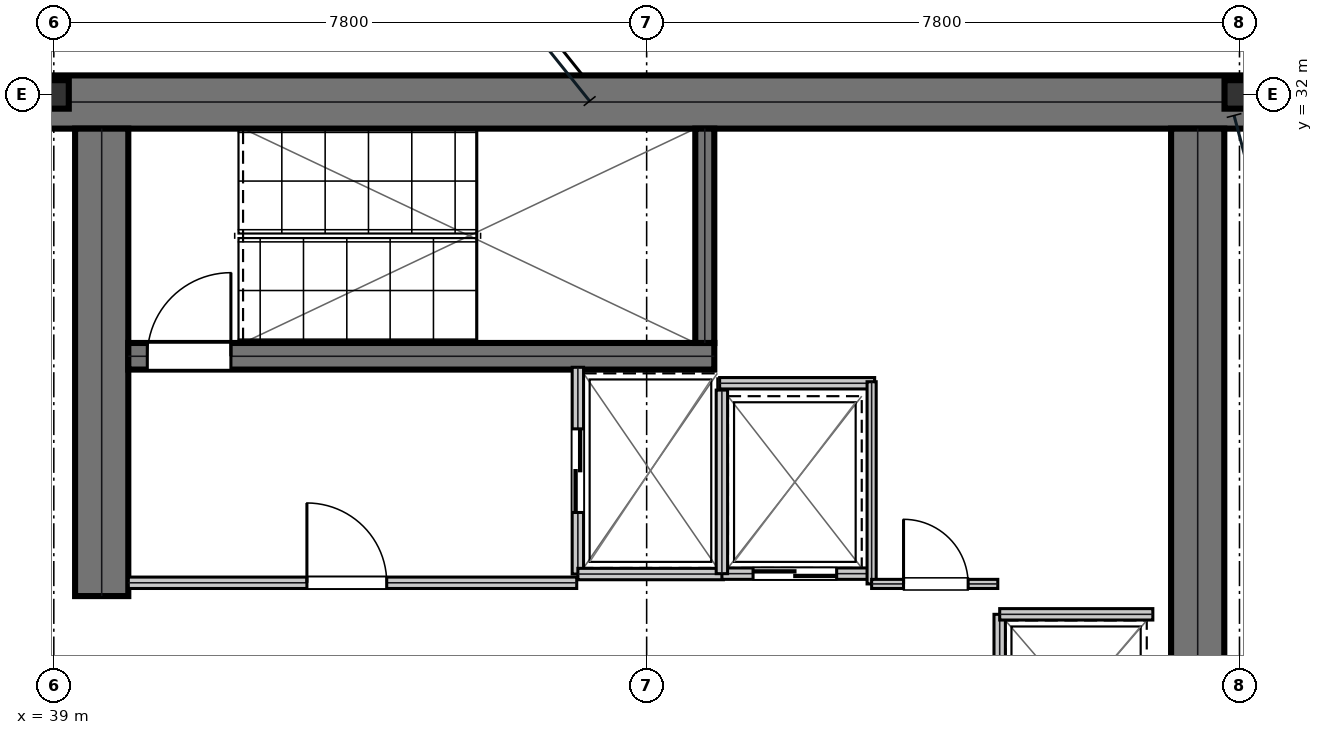
"""IFC4 building model, lengths in metres.
Left out: names, types, materials, properties, quantities, classifications, styles, units other than length and angle.
Written with IfcOpenShell. Run it as: python <this file> out.ifc"""

import sys

from ifc_helpers import new_model, si_unit, direction, frame, frame_2d, origin, origin_2d, place, context, subcontext, project, spatial, rectangle, i_section, extrude, element, fill, save


model = new_model("IFC4")
c1 = context("Model", 3, precision=1e-05, world=origin(), true_north=direction((0.0, 1.0)))
c2 = subcontext(c1, "Body", "Model", "MODEL_VIEW")
j1 = project(units=[si_unit("LENGTHUNIT", "METRE"), si_unit("PLANEANGLEUNIT", "RADIAN")], contexts=[c1])
p1 = place(None, origin())
s1 = spatial("IfcSite", under=j1, at=p1, CompositionType="ELEMENT")
p2 = place(p1, origin())
s2 = spatial("IfcBuilding", under=s1, at=p2, CompositionType="ELEMENT")
p3 = place(p2, frame((0.0, 0.0, 252.6)))
s3 = spatial("IfcBuildingStorey", under=s2, at=p3, CompositionType="ELEMENT", Elevation=252.6)
p4 = place(p3, frame((38.8, 31.9, 0.0), z_axis=(0.0, 0.0, 1.0), x_axis=(1.0, 0.0, 0.0)))
e1 = element("IfcWall", 1, at=p4, inside=s3, PredefinedType="SHEAR", context=c2, shape_type="SweptSolid", body=[
    extrude(rectangle(XDim=16.0, YDim=0.7, at=frame_2d((8.0, 0.0))), origin(), (0.0, 0.0, 1.0), 3.73),
])
p5 = place(p3, frame((39.63, 25.4, 0.0), z_axis=(0.0, 0.0, 1.0), x_axis=(0.0, 1.0, 0.0)))
e2 = element("IfcWall", 2, at=p5, inside=s3, PredefinedType="SHEAR", context=c2, shape_type="SweptSolid", body=[
    extrude(rectangle(XDim=6.15, YDim=0.7, at=frame_2d((3.075, 0.0))), origin(), (0.0, 0.0, 1.0), 3.73),
])
p6 = place(p3, frame((54.05, 16.45, 0.0), z_axis=(0.0, 0.0, 1.0), x_axis=(0.0, 1.0, 0.0)))
e3 = element("IfcWall", 3, at=p6, inside=s3, PredefinedType="SHEAR", context=c2, shape_type="SweptSolid", body=[
    extrude(rectangle(XDim=15.1, YDim=0.7, at=frame_2d((7.55, 0.0))), origin(), (0.0, 0.0, 1.0), 3.73),
])
p7 = place(p3, frame((39.98, 28.555, 0.0), z_axis=(0.0, 0.0, 1.0), x_axis=(1.0, 0.0, 0.0)))
e4 = element("IfcWall", 4, at=p7, inside=s3, PredefinedType="SHEAR", context=c2, shape_type="SweptSolid", body=[
    extrude(rectangle(XDim=7.71, YDim=0.35, at=frame_2d((3.855, 0.0))), origin(), (0.0, 0.0, 1.0), 3.73),
])
p8 = place(p7, frame((0.25, 0.0, 0.0)))
e5 = element("IfcOpeningElement", 5, at=p8, cuts=e4, PredefinedType="OPENING", context=c2, shape_type="SweptSolid", body=[
    extrude(rectangle(XDim=1.1, YDim=2.15, at=frame_2d((0.55, 1.075))), frame((0.0, 0.185, 0.0), z_axis=(0.0, -1.0, 0.0), x_axis=(1.0, 0.0, 0.0)), (0.0, 0.0, 1.0), 0.37),
])
p9 = place(p3, frame((47.565, 28.73, 0.0), z_axis=(0.0, 0.0, 1.0), x_axis=(0.0, 1.0, 0.0)))
e6 = element("IfcWall", 6, at=p9, inside=s3, PredefinedType="SHEAR", context=c2, shape_type="SweptSolid", body=[
    extrude(rectangle(XDim=2.82, YDim=0.25, at=frame_2d((1.41, 0.0))), origin(), (0.0, 0.0, 1.0), 3.73),
])
for number, where, z_axis, x_axis in (
    (7, (39.0, 32.0, 0.0), (0.0, 0.0, 1.0), (1.0, 0.0, 0.0)),
    (8, (54.6, 32.0, 0.0), (0.0, 0.0, 1.0), (1.0, 0.0, 0.0)),
):
    element("IfcColumn", number, at=place(p3, frame(where, z_axis=z_axis, x_axis=x_axis)), inside=s3, PredefinedType="COLUMN", context=c2, shape_type="SweptSolid", body=[
        extrude(i_section(OverallWidth=0.394, OverallDepth=0.375, WebThickness=0.017, FlangeThickness=0.028, at=origin_2d()), origin(), (0.0, 0.0, 1.0), 4.044),
    ])
p10 = place(p3, frame((39.98, 25.575, 0.0), z_axis=(0.0, 0.0, 1.0), x_axis=(1.0, 0.0, 0.0)))
e9 = element("IfcWall", 9, at=p10, inside=s3, PredefinedType="PARTITIONING", context=c2, shape_type="SweptSolid", body=[
    extrude(rectangle(XDim=5.9, YDim=0.15, at=frame_2d((2.95, 0.0))), origin(), (0.0, 0.0, 1.0), 3.73),
])
p11 = place(p10, frame((2.35, 0.0, 0.0)))
e10 = element("IfcOpeningElement", 10, at=p11, cuts=e9, PredefinedType="OPENING", context=c2, shape_type="SweptSolid", body=[
    extrude(rectangle(XDim=1.05, YDim=2.15, at=frame_2d((0.525, 1.075))), frame((0.0, 0.085, 0.0), z_axis=(0.0, -1.0, 0.0), x_axis=(1.0, 0.0, 0.0)), (0.0, 0.0, 1.0), 0.17),
])
p12 = place(p3, frame((45.895, 25.69, 0.0), z_axis=(0.0, 0.0, 1.0), x_axis=(0.0, 1.0, 0.0)))
e11 = element("IfcWall", 11, at=p12, inside=s3, PredefinedType="PARTITIONING", context=c2, shape_type="SweptSolid", body=[
    extrude(rectangle(XDim=2.72, YDim=0.15, at=frame_2d((1.36, 0.0))), origin(), (0.0, 0.0, 1.0), 3.73),
])
p13 = place(p12, frame((0.81, 0.0, 0.0)))
e12 = element("IfcOpeningElement", 12, at=p13, cuts=e11, PredefinedType="OPENING", context=c2, shape_type="SweptSolid", body=[
    extrude(rectangle(XDim=1.1, YDim=2.15, at=frame_2d((0.55, 1.075))), frame((0.0, 0.085, 0.0), z_axis=(0.0, -1.0, 0.0), x_axis=(1.0, 0.0, 0.0)), (0.0, 0.0, 1.0), 0.17),
])
p14 = place(p3, frame((45.895, 25.69, 0.0), z_axis=(0.0, 0.0, 1.0), x_axis=(1.0, 0.0, 0.0)))
e13 = element("IfcWall", 13, at=p14, inside=s3, PredefinedType="PARTITIONING", context=c2, shape_type="SweptSolid", body=[
    extrude(rectangle(XDim=1.915, YDim=0.15, at=frame_2d((0.958, 0.0))), origin(), (0.0, 0.0, 1.0), 3.73),
])
p15 = place(p3, frame((47.79, 25.695, 0.0), z_axis=(0.0, 0.0, 1.0), x_axis=(1.0, 0.0, 0.0)))
e14 = element("IfcWall", 14, at=p15, inside=s3, PredefinedType="PARTITIONING", context=c2, shape_type="SweptSolid", body=[
    extrude(rectangle(XDim=1.92, YDim=0.15, at=frame_2d((0.96, 0.0))), origin(), (0.0, 0.0, 1.0), 3.73),
])
p16 = place(p15, frame((0.41, 0.0, 0.0)))
e15 = element("IfcOpeningElement", 15, at=p16, cuts=e14, PredefinedType="OPENING", context=c2, shape_type="SweptSolid", body=[
    extrude(rectangle(XDim=1.1, YDim=2.15, at=frame_2d((0.55, 1.075))), frame((0.0, 0.085, 0.0), z_axis=(0.0, -1.0, 0.0), x_axis=(1.0, 0.0, 0.0)), (0.0, 0.0, 1.0), 0.17),
])
p17 = place(p3, frame((47.79, 25.695, 0.0), z_axis=(0.0, 0.0, 1.0), x_axis=(0.0, 1.0, 0.0)))
e16 = element("IfcWall", 16, at=p17, inside=s3, PredefinedType="PARTITIONING", context=c2, shape_type="SweptSolid", body=[
    extrude(rectangle(XDim=2.415, YDim=0.15, at=frame_2d((1.208, 0.0))), origin(), (0.0, 0.0, 1.0), 3.73),
])
p18 = place(p3, frame((51.445, 22.84, 0.0), z_axis=(0.0, 0.0, 1.0), x_axis=(0.0, 1.0, 0.0)))
e17 = element("IfcWall", 17, at=p18, inside=s3, PredefinedType="PARTITIONING", context=c2, shape_type="SweptSolid", body=[
    extrude(rectangle(XDim=2.32, YDim=0.15, at=frame_2d((1.16, 0.0))), origin(), (0.0, 0.0, 1.0), 3.73),
])
p19 = place(p18, frame((0.61, 0.0, 0.0)))
e18 = element("IfcOpeningElement", 18, at=p19, cuts=e17, PredefinedType="OPENING", context=c2, shape_type="SweptSolid", body=[
    extrude(rectangle(XDim=1.1, YDim=2.15, at=frame_2d((0.55, 1.075))), frame((0.0, 0.085, 0.0), z_axis=(0.0, -1.0, 0.0), x_axis=(1.0, 0.0, 0.0)), (0.0, 0.0, 1.0), 0.17),
])
p20 = place(p3, frame((51.445, 25.16, 0.0), z_axis=(0.0, 0.0, 1.0), x_axis=(1.0, 0.0, 0.0)))
e19 = element("IfcWall", 19, at=p20, inside=s3, PredefinedType="PARTITIONING", context=c2, shape_type="SweptSolid", body=[
    extrude(rectangle(XDim=2.015, YDim=0.15, at=frame_2d((1.007, 0.0))), origin(), (0.0, 0.0, 1.0), 3.73),
])
p21 = place(p3, frame((47.76, 28.2, 0.0), z_axis=(0.0, 0.0, 1.0), x_axis=(1.0, 0.0, 0.0)))
e20 = element("IfcWall", 20, at=p21, inside=s3, PredefinedType="PARTITIONING", context=c2, shape_type="SweptSolid", body=[
    extrude(rectangle(XDim=2.04, YDim=0.15, at=frame_2d((1.02, 0.0))), origin(), (0.0, 0.0, 1.0), 3.73),
])
p22 = place(p3, frame((49.76, 25.56, 0.0), z_axis=(0.0, 0.0, 1.0), x_axis=(0.0, 1.0, 0.0)))
e21 = element("IfcWall", 21, at=p22, inside=s3, PredefinedType="PARTITIONING", context=c2, shape_type="SweptSolid", body=[
    extrude(rectangle(XDim=2.66, YDim=0.12, at=frame_2d((1.33, 0.0))), origin(), (0.0, 0.0, 1.0), 3.73),
])
p23 = place(p3, frame((49.76, 25.56, 0.0), z_axis=(0.0, 0.0, 1.0), x_axis=(1.0, 0.0, 0.0)))
e22 = element("IfcWall", 22, at=p23, inside=s3, PredefinedType="PARTITIONING", context=c2, shape_type="SweptSolid", body=[
    extrude(rectangle(XDim=1.66, YDim=0.12, at=frame_2d((0.83, 0.0))), origin(), (0.0, 0.0, 1.0), 3.73),
])
p24 = place(p23, frame((0.42, 0.0, 0.0)))
e23 = element("IfcOpeningElement", 23, at=p24, cuts=e22, PredefinedType="OPENING", context=c2, shape_type="SweptSolid", body=[
    extrude(rectangle(XDim=0.85, YDim=2.15, at=frame_2d((0.425, 1.075))), frame((0.0, 0.07, 0.0), z_axis=(0.0, -1.0, 0.0), x_axis=(1.0, 0.0, 0.0)), (0.0, 0.0, 1.0), 0.14),
])
p25 = place(p11, origin())
e24 = element("IfcDoor", 24, at=p25, inside=s3, OperationType="SINGLE_SWING_LEFT", PredefinedType="DOOR", context=c2, shape_type="SweptSolid", body=[
    extrude(rectangle(XDim=1.05, YDim=2.15, at=frame_2d((0.525, 1.075))), frame((0.0, 0.025, 0.0), z_axis=(0.0, -1.0, 0.0), x_axis=(1.0, 0.0, 0.0)), (0.0, 0.0, 1.0), 0.05),
])
fill(e10, e24)
p26 = place(p13, frame((1.1, 0.0, 0.0), z_axis=(0.0, 0.0, 1.0), x_axis=(-1.0, 0.0, 0.0)))
e25 = element("IfcDoor", 25, at=p26, inside=s3, OperationType="DOUBLE_DOOR_SLIDING", PredefinedType="DOOR", context=c2, shape_type="SweptSolid", body=[
    extrude(rectangle(XDim=1.1, YDim=2.15, at=frame_2d((0.55, 1.075))), frame((0.0, 0.025, 0.0), z_axis=(0.0, -1.0, 0.0), x_axis=(1.0, 0.0, 0.0)), (0.0, 0.0, 1.0), 0.05),
])
fill(e12, e25)
p27 = place(p16, frame((1.1, 0.0, 0.0), z_axis=(0.0, 0.0, 1.0), x_axis=(-1.0, 0.0, 0.0)))
e26 = element("IfcDoor", 26, at=p27, inside=s3, OperationType="DOUBLE_DOOR_SLIDING", PredefinedType="DOOR", context=c2, shape_type="SweptSolid", body=[
    extrude(rectangle(XDim=1.1, YDim=2.15, at=frame_2d((0.55, 1.075))), frame((0.0, 0.025, 0.0), z_axis=(0.0, -1.0, 0.0), x_axis=(1.0, 0.0, 0.0)), (0.0, 0.0, 1.0), 0.05),
])
fill(e15, e26)
p28 = place(p24, origin())
e27 = element("IfcDoor", 27, at=p28, inside=s3, OperationType="SINGLE_SWING_LEFT", PredefinedType="DOOR", context=c2, shape_type="SweptSolid", body=[
    extrude(rectangle(XDim=0.85, YDim=2.15, at=frame_2d((0.425, 1.075))), frame((0.0, 0.025, 0.0), z_axis=(0.0, -1.0, 0.0), x_axis=(1.0, 0.0, 0.0)), (0.0, 0.0, 1.0), 0.05),
])
fill(e23, e27)
p29 = place(p8, origin())
e28 = element("IfcDoor", 28, at=p29, inside=s3, OperationType="SINGLE_SWING_RIGHT", PredefinedType="DOOR", context=c2, shape_type="SweptSolid", body=[
    extrude(rectangle(XDim=1.1, YDim=2.15, at=frame_2d((0.55, 1.075))), frame((0.0, 0.025, 0.0), z_axis=(0.0, -1.0, 0.0), x_axis=(1.0, 0.0, 0.0)), (0.0, 0.0, 1.0), 0.05),
])
fill(e5, e28)
save(model, sys.argv[1])
